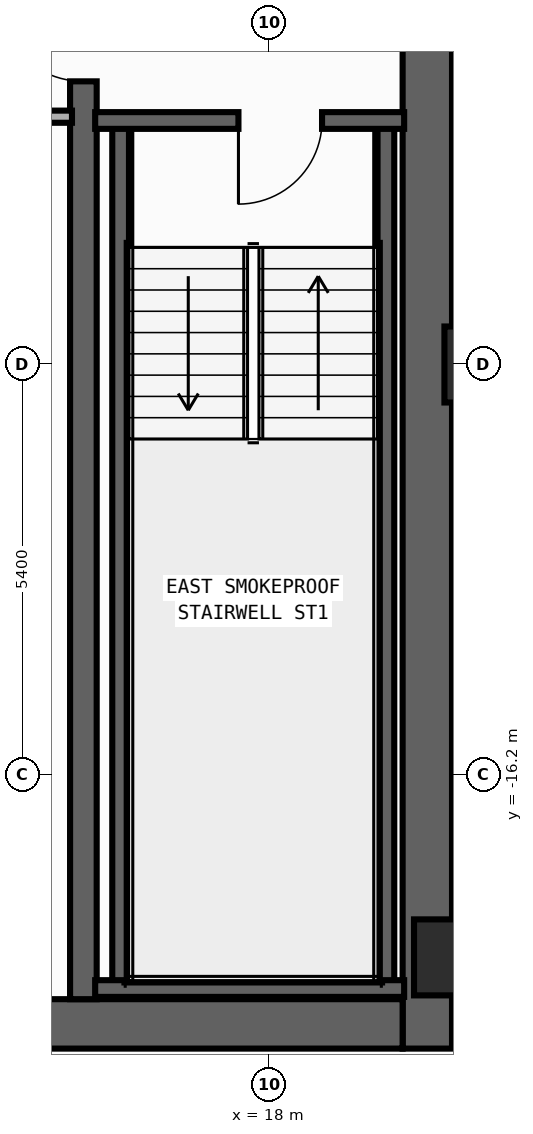
"""IFC4 building model, lengths in metres.
Left out: names, types, materials, properties, quantities, classifications, styles, units other than length and angle.
Written with IfcOpenShell. Run it as: python <this file> out.ifc"""

import sys

from ifc_helpers import new_model, si_unit, direction, frame, frame_2d, origin, origin_2d, place, context, subcontext, project, spatial, rectangle, extrude, element, fill, save


model = new_model("IFC4")
c1 = context("Model", 3, precision=1e-05, world=origin(), true_north=direction((0.0, 1.0)))
c2 = subcontext(c1, "Body", "Model", "MODEL_VIEW")
j1 = project(units=[si_unit("LENGTHUNIT", "METRE"), si_unit("PLANEANGLEUNIT", "RADIAN")], contexts=[c1])
p1 = place(None, origin())
s1 = spatial("IfcSite", under=j1, at=p1, CompositionType="ELEMENT")
p2 = place(p1, origin())
s2 = spatial("IfcBuilding", under=s1, at=p2, CompositionType="ELEMENT")
p3 = place(p2, frame((0.0, 0.0, 187.8)))
s3 = spatial("IfcBuildingStorey", under=s2, at=p3, CompositionType="ELEMENT", Elevation=187.8)
p4 = place(p3, frame((20.075, -19.8, 0.0), z_axis=(0.0, 0.0, 1.0), x_axis=(0.0, 1.0, 0.0)))
e1 = element("IfcWall", 1, at=p4, inside=s3, PredefinedType="SHEAR", context=c2, shape_type="SweptSolid", body=[
    extrude(rectangle(XDim=27.0, YDim=0.65, at=frame_2d((13.5, 0.0))), origin(), (0.0, 0.0, 1.0), 3.54),
])
p5 = place(p3, frame((12.65, -19.475, 0.0), z_axis=(0.0, 0.0, 1.0), x_axis=(1.0, 0.0, 0.0)))
e2 = element("IfcWall", 2, at=p5, inside=s3, PredefinedType="SHEAR", context=c2, shape_type="SweptSolid", body=[
    extrude(rectangle(XDim=7.1, YDim=0.65, at=frame_2d((3.55, 0.0))), origin(), (0.0, 0.0, 1.0), 3.54),
])
p6 = place(p3, frame((15.55, -19.15, 0.0), z_axis=(0.0, 0.0, 1.0), x_axis=(0.0, 1.0, 0.0)))
e3 = element("IfcWall", 3, at=p6, inside=s3, PredefinedType="SHEAR", context=c2, shape_type="SweptSolid", body=[
    extrude(rectangle(XDim=25.7, YDim=0.35, at=frame_2d((12.85, 0.0))), origin(), (0.0, 0.0, 1.0), 3.54),
])
p7 = place(p6, frame((12.075, 0.0, 0.0)))
e4 = element("IfcOpeningElement", 4, at=p7, cuts=e3, PredefinedType="OPENING", context=c2, shape_type="SweptSolid", body=[
    extrude(rectangle(XDim=1.15, YDim=2.2, at=frame_2d((0.575, 1.1))), frame((0.0, 0.185, 0.0), z_axis=(0.0, -1.0, 0.0), x_axis=(1.0, 0.0, 0.0)), (0.0, 0.0, 1.0), 0.37),
])
p8 = place(p6, frame((24.475, 0.0, 0.0)))
e5 = element("IfcOpeningElement", 5, at=p8, cuts=e3, PredefinedType="OPENING", context=c2, shape_type="SweptSolid", body=[
    extrude(rectangle(XDim=0.85, YDim=2.1, at=frame_2d((0.425, 1.05))), frame((0.0, 0.185, 0.0), z_axis=(0.0, -1.0, 0.0), x_axis=(1.0, 0.0, 0.0)), (0.0, 0.0, 1.0), 0.37),
])
for number, where, z_axis, x_axis in (
    (6, (16.04, -19.01, 0.0), (0.0, 0.0, 1.0), (0.0, 1.0, 0.0)),
    (7, (19.53, -19.01, 0.0), (0.0, 0.0, 1.0), (0.0, 1.0, 0.0)),
):
    element("IfcWall", number, at=place(p3, frame(where, z_axis=z_axis, x_axis=x_axis)), inside=s3, PredefinedType="SHEAR", context=c2, shape_type="SweptSolid", body=[
        extrude(rectangle(XDim=11.42, YDim=0.22, at=frame_2d((5.71, 0.0))), origin(), (0.0, 0.0, 1.0), 3.54),
    ])
p9 = place(p3, frame((15.705, -19.01, 0.0), z_axis=(0.0, 0.0, 1.0), x_axis=(1.0, 0.0, 0.0)))
e8 = element("IfcWall", 8, at=p9, inside=s3, PredefinedType="SHEAR", context=c2, shape_type="SweptSolid", body=[
    extrude(rectangle(XDim=4.065, YDim=0.22, at=frame_2d((2.032, 0.0))), origin(), (0.0, 0.0, 1.0), 3.54),
])
p10 = place(p3, frame((19.77, -7.59, 0.0), z_axis=(0.0, 0.0, 1.0), x_axis=(-1.0, 0.0, 0.0)))
e9 = element("IfcWall", 9, at=p10, inside=s3, PredefinedType="SHEAR", context=c2, shape_type="SweptSolid", body=[
    extrude(rectangle(XDim=4.065, YDim=0.22, at=frame_2d((2.032, 0.0))), origin(), (0.0, 0.0, 1.0), 3.54),
])
p11 = place(p10, frame((1.08, 0.0, 0.0)))
e10 = element("IfcOpeningElement", 10, at=p11, cuts=e9, PredefinedType="OPENING", context=c2, shape_type="SweptSolid", body=[
    extrude(rectangle(XDim=1.1, YDim=2.2, at=frame_2d((0.55, 1.1))), frame((0.0, 0.12, 0.0), z_axis=(0.0, -1.0, 0.0), x_axis=(1.0, 0.0, 0.0)), (0.0, 0.0, 1.0), 0.24),
])
for number, where, z_axis, x_axis in (
    (11, (20.4, -18.6, 0.0), (0.0, 0.0, 1.0), (1.0, 0.0, 0.0)),
    (12, (20.8, -10.8, 0.0), (0.0, 0.0, 1.0), (1.0, 0.0, 0.0)),
):
    element("IfcColumn", number, at=place(p3, frame(where, z_axis=z_axis, x_axis=x_axis)), inside=s3, PredefinedType="COLUMN", context=c2, shape_type="SweptSolid", body=[
        extrude(rectangle(XDim=1.0, YDim=1.0, at=origin_2d()), origin(), (0.0, 0.0, 1.0), 3.8),
    ])
p12 = place(p3, frame((12.8, -7.54, 0.0), z_axis=(0.0, 0.0, 1.0), x_axis=(1.0, 0.0, 0.0)))
e13 = element("IfcWall", 13, at=p12, inside=s3, PredefinedType="STANDARD", context=c2, shape_type="SweptSolid", body=[
    extrude(rectangle(XDim=2.6, YDim=0.16, at=frame_2d((1.3, 0.0))), origin(), (0.0, 0.0, 1.0), 3.54),
])
p13 = place(p11, origin())
e14 = element("IfcDoor", 14, at=p13, inside=s3, OperationType="SINGLE_SWING_RIGHT", PredefinedType="DOOR", context=c2, shape_type="SweptSolid", body=[
    extrude(rectangle(XDim=1.1, YDim=2.2, at=frame_2d((0.55, 1.1))), frame((0.0, 0.025, 0.0), z_axis=(0.0, -1.0, 0.0), x_axis=(1.0, 0.0, 0.0)), (0.0, 0.0, 1.0), 0.05),
])
fill(e10, e14)
p14 = place(p7, origin())
e15 = element("IfcDoor", 15, at=p14, inside=s3, OperationType="SINGLE_SWING_RIGHT", PredefinedType="DOOR", context=c2, shape_type="SweptSolid", body=[
    extrude(rectangle(XDim=1.15, YDim=2.2, at=frame_2d((0.575, 1.1))), frame((0.0, 0.025, 0.0), z_axis=(0.0, -1.0, 0.0), x_axis=(1.0, 0.0, 0.0)), (0.0, 0.0, 1.0), 0.05),
])
fill(e4, e15)
save(model, sys.argv[1])
